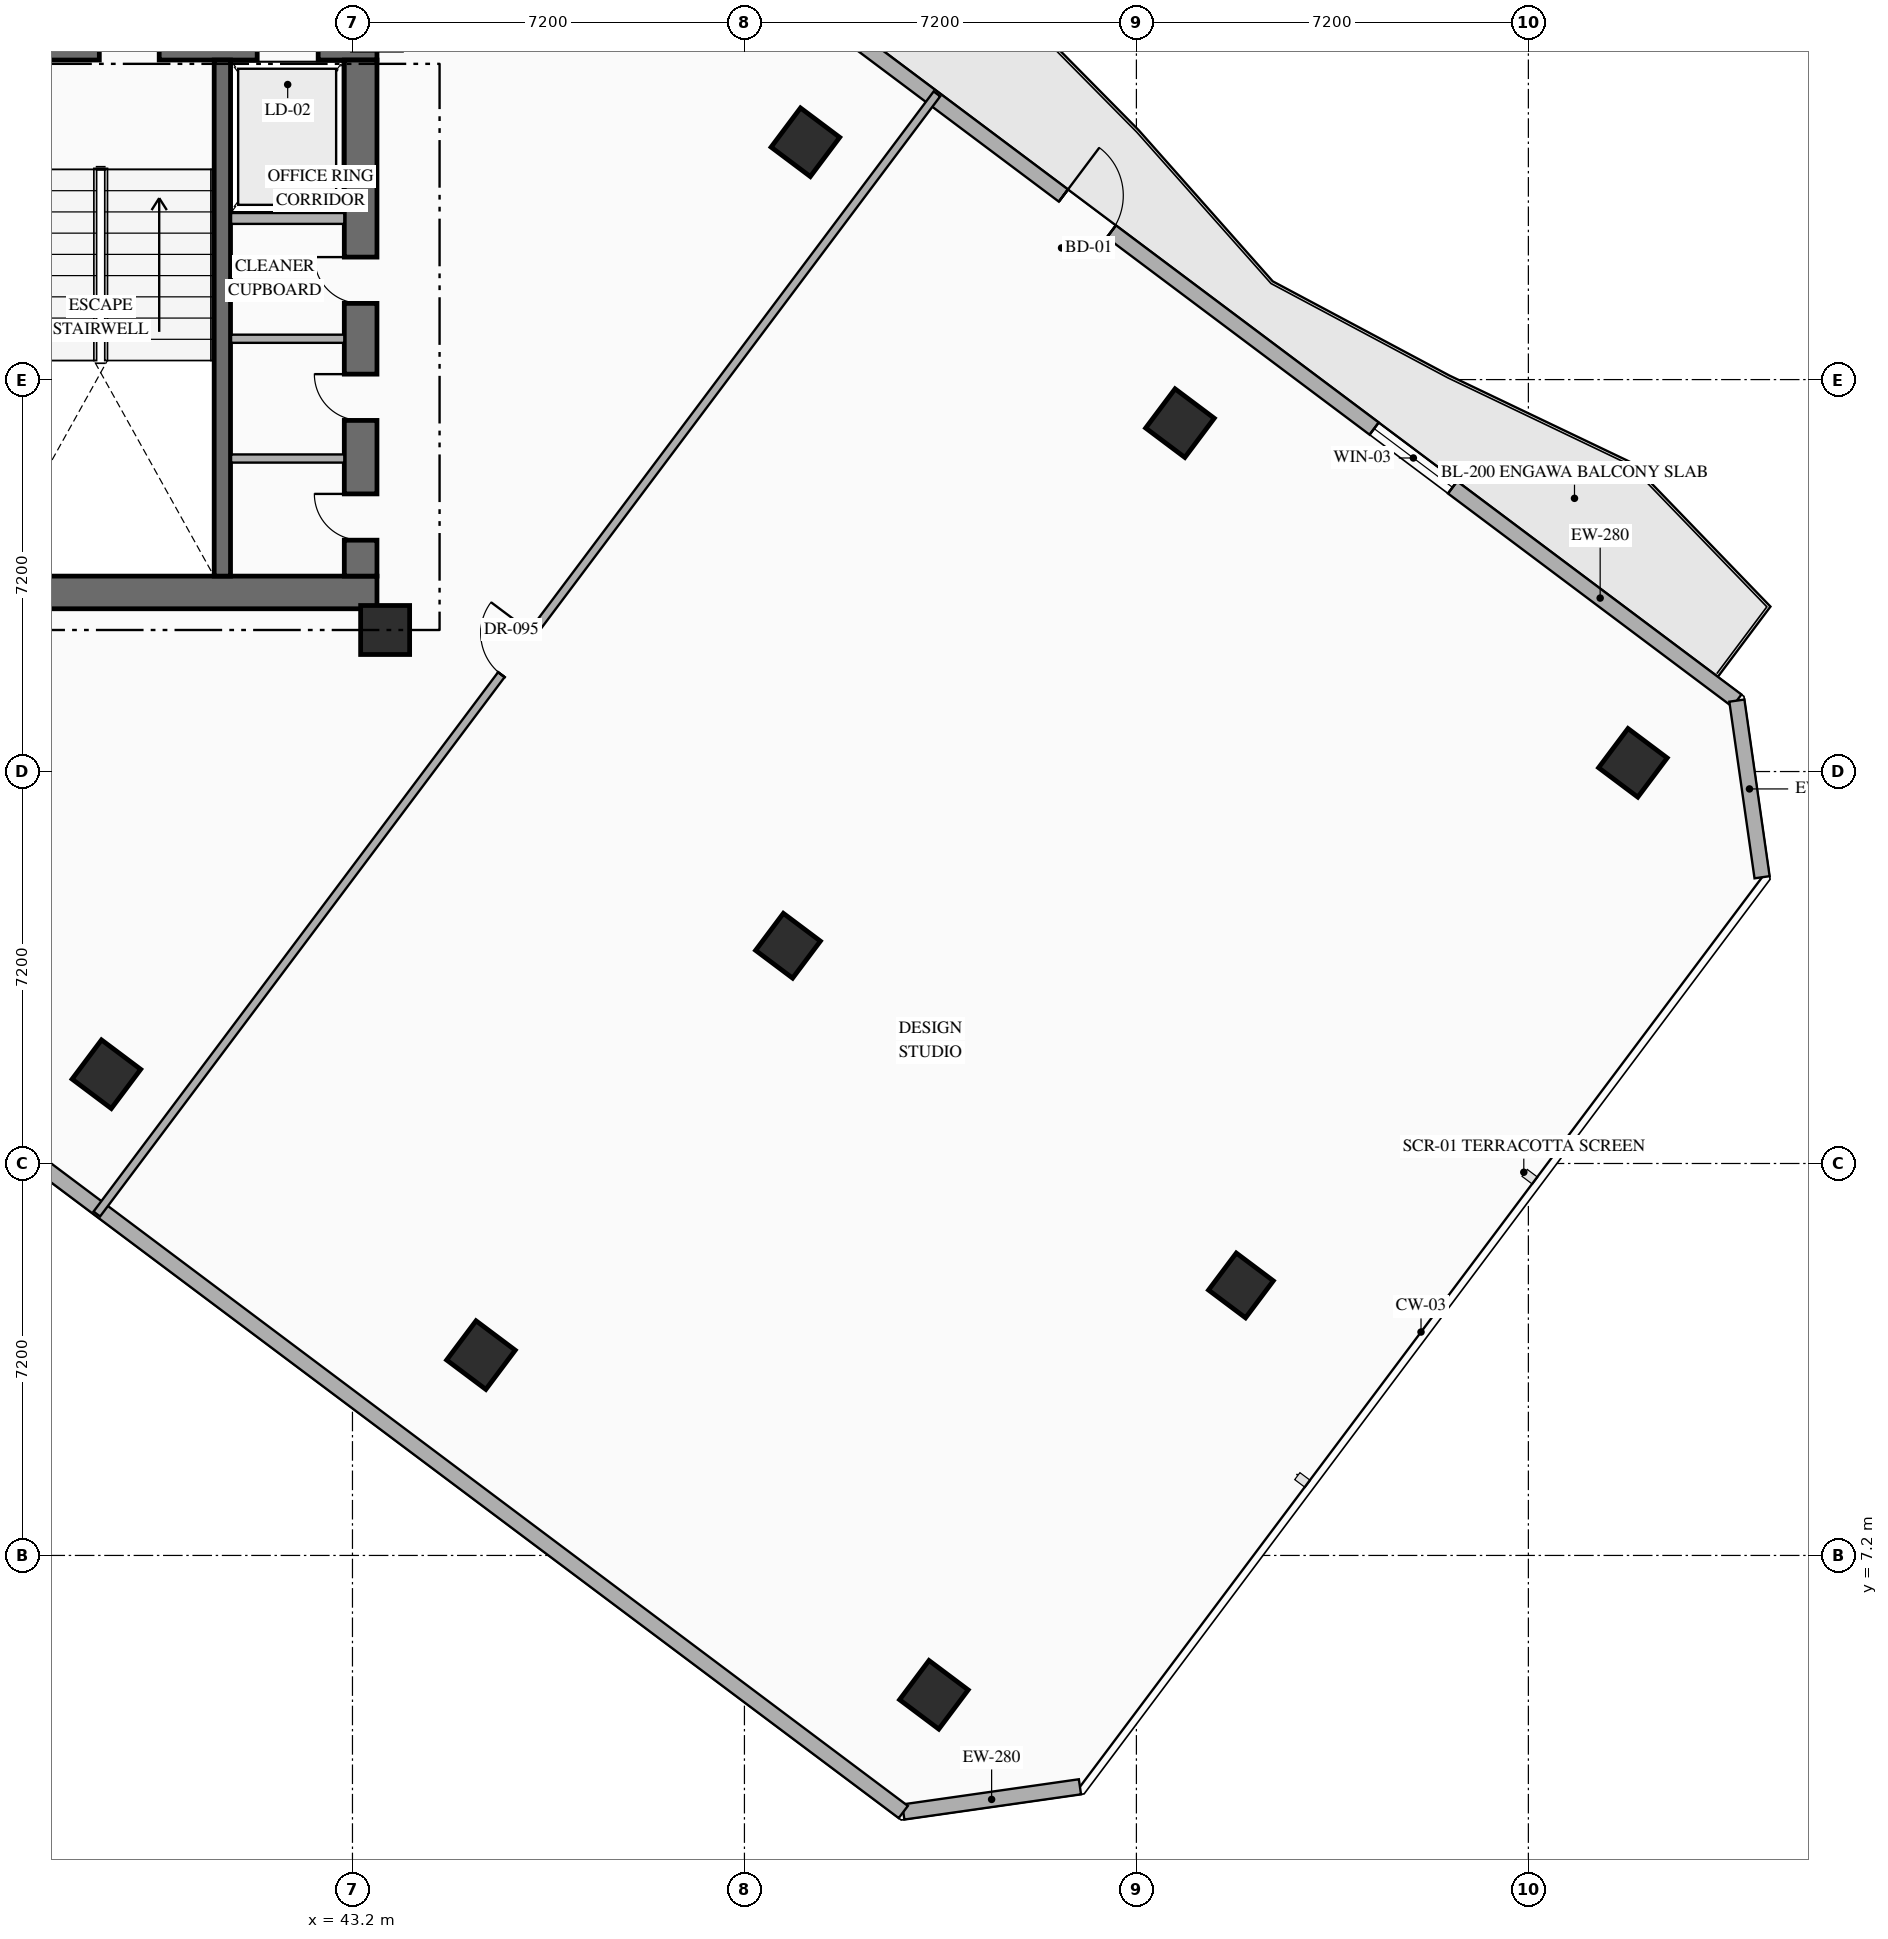
"""IFC4 building model, lengths in metres.
Left out: names, types, materials, properties, quantities, classifications, styles, units other than length and angle.
Written with IfcOpenShell. Run it as: python <this file> out.ifc"""

import sys

from ifc_helpers import new_model, si_unit, direction, frame, frame_2d, origin, origin_2d, place, context, subcontext, project, spatial, rectangle, hollow_rectangle, extrude, element, fill, save


model = new_model("IFC4")
c1 = context("Model", 3, precision=1e-05, world=origin(), true_north=direction((0.0, 1.0)))
c2 = subcontext(c1, "Body", "Model", "MODEL_VIEW")
j1 = project(units=[si_unit("LENGTHUNIT", "METRE"), si_unit("PLANEANGLEUNIT", "RADIAN")], contexts=[c1])
p1 = place(None, origin())
s1 = spatial("IfcSite", under=j1, at=p1, CompositionType="ELEMENT")
p2 = place(p1, origin())
s2 = spatial("IfcBuilding", under=s1, at=p2, CompositionType="ELEMENT")
p3 = place(p2, frame((0.0, 0.0, 104.85)))
s3 = spatial("IfcBuildingStorey", under=s2, at=p3, CompositionType="ELEMENT", Elevation=104.85)
p4 = place(p3, frame((35.89, 24.89, 0.0), z_axis=(0.0, 0.0, 1.0), x_axis=(1.0, 0.0, 0.0)))
e1 = element("IfcWall", 1, at=p4, inside=s3, PredefinedType="SHEAR", context=c2, shape_type="SweptSolid", body=[
    extrude(rectangle(XDim=7.76, YDim=0.6, at=frame_2d((3.88, 0.0))), origin(), (0.0, 0.0, 1.0), 3.6),
])
p5 = place(p3, frame((35.89, 34.97, 0.0), z_axis=(0.0, 0.0, 1.0), x_axis=(1.0, 0.0, 0.0)))
e2 = element("IfcWall", 2, at=p5, inside=s3, PredefinedType="SHEAR", context=c2, shape_type="SweptSolid", body=[
    extrude(rectangle(XDim=7.76, YDim=0.6, at=frame_2d((3.88, 0.0))), origin(), (0.0, 0.0, 1.0), 3.6),
])
p6 = place(p5, frame((2.66, 0.0, 0.0)))
e3 = element("IfcOpeningElement", 3, at=p6, cuts=e2, PredefinedType="OPENING", context=c2, shape_type="SweptSolid", body=[
    extrude(rectangle(XDim=1.1, YDim=2.2, at=frame_2d((0.55, 1.1))), frame((0.0, 0.31, 0.0), z_axis=(0.0, -1.0, 0.0), x_axis=(1.0, 0.0, 0.0)), (0.0, 0.0, 1.0), 0.62),
])
p7 = place(p5, frame((5.56, 0.0, 0.0)))
e4 = element("IfcOpeningElement", 4, at=p7, cuts=e2, PredefinedType="OPENING", context=c2, shape_type="SweptSolid", body=[
    extrude(rectangle(XDim=1.12, YDim=2.15, at=frame_2d((0.56, 1.075))), frame((0.0, 0.31, 0.0), z_axis=(0.0, -1.0, 0.0), x_axis=(1.0, 0.0, 0.0)), (0.0, 0.0, 1.0), 0.62),
])
p8 = place(p3, frame((43.35, 25.19, 0.0), z_axis=(0.0, 0.0, 1.0), x_axis=(0.0, 1.0, 0.0)))
e5 = element("IfcWall", 5, at=p8, inside=s3, PredefinedType="SHEAR", context=c2, shape_type="SweptSolid", body=[
    extrude(rectangle(XDim=9.48, YDim=0.6, at=frame_2d((4.74, 0.0))), origin(), (0.0, 0.0, 1.0), 3.6),
])
p9 = place(p8, frame((0.66, 0.0, 0.0)))
e6 = element("IfcOpeningElement", 6, at=p9, cuts=e5, PredefinedType="OPENING", context=c2, shape_type="SweptSolid", body=[
    extrude(rectangle(XDim=0.85, YDim=2.08, at=frame_2d((0.425, 1.04))), frame((0.0, 0.31, 0.0), z_axis=(0.0, -1.0, 0.0), x_axis=(1.0, 0.0, 0.0)), (0.0, 0.0, 1.0), 0.62),
])
p10 = place(p8, frame((2.86, 0.0, 0.0)))
e7 = element("IfcOpeningElement", 7, at=p10, cuts=e5, PredefinedType="OPENING", context=c2, shape_type="SweptSolid", body=[
    extrude(rectangle(XDim=0.85, YDim=2.08, at=frame_2d((0.425, 1.04))), frame((0.0, 0.31, 0.0), z_axis=(0.0, -1.0, 0.0), x_axis=(1.0, 0.0, 0.0)), (0.0, 0.0, 1.0), 0.62),
])
p11 = place(p8, frame((5.01, 0.0, 0.0)))
e8 = element("IfcOpeningElement", 8, at=p11, cuts=e5, PredefinedType="OPENING", context=c2, shape_type="SweptSolid", body=[
    extrude(rectangle(XDim=0.85, YDim=2.08, at=frame_2d((0.425, 1.04))), frame((0.0, 0.31, 0.0), z_axis=(0.0, -1.0, 0.0), x_axis=(1.0, 0.0, 0.0)), (0.0, 0.0, 1.0), 0.62),
])
p12 = place(p3, frame((40.81, 25.19, 0.0), z_axis=(0.0, 0.0, 1.0), x_axis=(0.0, 1.0, 0.0)))
e9 = element("IfcWall", 9, at=p12, inside=s3, PredefinedType="SHEAR", context=c2, shape_type="SweptSolid", body=[
    extrude(rectangle(XDim=9.48, YDim=0.3, at=frame_2d((4.74, 0.0))), origin(), (0.0, 0.0, 1.0), 3.6),
])
p13 = place(p3, frame((43.8, 24.2, 0.0), z_axis=(0.0, 0.0, 1.0), x_axis=(1.0, 0.0, 0.0)))
e10 = element("IfcColumn", 10, at=p13, inside=s3, PredefinedType="COLUMN", context=c2, shape_type="SweptSolid", body=[
    extrude(rectangle(XDim=0.9, YDim=0.9, at=origin_2d()), origin(), (0.0, 0.0, 1.0), 3.6),
])
for number, where, z_axis, x_axis in (
    (11, (38.68, 16.04, 0.0), (0.0, 0.0, 1.0), (0.8, -0.6, 0.0)),
    (12, (51.52, 33.16, 0.0), (0.0, 0.0, 1.0), (0.8, -0.6, 0.0)),
    (13, (45.56, 10.88, 0.0), (0.0, 0.0, 1.0), (0.8, -0.6, 0.0)),
    (14, (58.4, 28.0, 0.0), (0.0, 0.0, 1.0), (0.8, -0.6, 0.0)),
):
    element("IfcColumn", number, at=place(p3, frame(where, z_axis=z_axis, x_axis=x_axis)), inside=s3, PredefinedType="COLUMN", context=c2, shape_type="SweptSolid", body=[
        extrude(hollow_rectangle(XDim=0.9, YDim=0.9, WallThickness=0.036, at=origin_2d()), origin(), (0.0, 0.0, 1.0), 3.6),
    ])
p14 = place(p3, frame((51.2, 18.4, 0.0), z_axis=(0.0, 0.0, 1.0), x_axis=(0.799999996291, -0.600000004945, 0.0)))
e15 = element("IfcColumn", 15, at=p14, inside=s3, PredefinedType="COLUMN", context=c2, shape_type="SweptSolid", body=[
    extrude(hollow_rectangle(XDim=0.85, YDim=0.85, WallThickness=0.032, at=origin_2d()), origin(), (0.0, 0.0, 1.0), 3.6),
])
for number, where, z_axis, x_axis in (
    (16, (53.88, 4.64, 0.0), (0.0, 0.0, 1.0), (0.8, -0.6, 0.0)),
    (17, (66.72, 21.76, 0.0), (0.0, 0.0, 1.0), (0.8, -0.6, 0.0)),
):
    element("IfcColumn", number, at=place(p3, frame(where, z_axis=z_axis, x_axis=x_axis)), inside=s3, PredefinedType="COLUMN", context=c2, shape_type="SweptSolid", body=[
        extrude(hollow_rectangle(XDim=0.9, YDim=0.9, WallThickness=0.036, at=origin_2d()), origin(), (0.0, 0.0, 1.0), 3.6),
    ])
p15 = place(p3, frame((59.52, 12.16, 0.0), z_axis=(0.0, 0.0, 1.0), x_axis=(0.799999996291, -0.600000004945, 0.0)))
e18 = element("IfcColumn", 18, at=p15, inside=s3, PredefinedType="COLUMN", context=c2, shape_type="SweptSolid", body=[
    extrude(hollow_rectangle(XDim=0.85, YDim=0.85, WallThickness=0.032, at=origin_2d()), origin(), (0.0, 0.0, 1.0), 3.6),
])
p16 = place(p3, frame((44.86, 40.73, 0.0), z_axis=(0.0, 0.0, 1.0), x_axis=(0.800006902154, -0.599990797017, 0.0)))
e19 = element("IfcWall", 19, at=p16, inside=s3, PredefinedType="STANDARD", context=c2, shape_type="SweptSolid", body=[
    extrude(rectangle(XDim=29.712, YDim=0.28, at=frame_2d((14.856, 0.0))), origin(), (0.0, 0.0, 1.0), 3.35),
])
p17 = place(p16, frame((14.249, 0.0, 0.0)))
e20 = element("IfcOpeningElement", 20, at=p17, cuts=e19, PredefinedType="OPENING", context=c2, shape_type="SweptSolid", body=[
    extrude(rectangle(XDim=1.1, YDim=2.2, at=frame_2d((0.55, 1.1))), frame((0.0, 0.15, 0.0), z_axis=(0.0, -1.0, 0.0), x_axis=(1.0, 0.0, 0.0)), (0.0, 0.0, 1.0), 0.3),
])
p18 = place(p16, frame((6.528, 0.0, 0.85)))
e21 = element("IfcOpeningElement", 21, at=p18, cuts=e19, PredefinedType="OPENING", context=c2, shape_type="SweptSolid", body=[
    extrude(rectangle(XDim=1.8, YDim=2.1, at=frame_2d((0.9, 1.05))), frame((0.0, 0.15, 0.0), z_axis=(0.0, -1.0, 0.0), x_axis=(1.0, 0.0, 0.0)), (0.0, 0.0, 1.0), 0.3),
])
p19 = place(p16, frame((21.384, 0.0, 0.85)))
e22 = element("IfcOpeningElement", 22, at=p19, cuts=e19, PredefinedType="OPENING", context=c2, shape_type="SweptSolid", body=[
    extrude(rectangle(XDim=1.8, YDim=2.1, at=frame_2d((0.9, 1.05))), frame((0.0, 0.15, 0.0), z_axis=(0.0, -1.0, 0.0), x_axis=(1.0, 0.0, 0.0)), (0.0, 0.0, 1.0), 0.3),
])
p20 = place(p3, frame((68.63, 22.903, 0.0), z_axis=(0.0, 0.0, 1.0), x_axis=(0.141285803956, -0.989968848803, 0.0)))
e23 = element("IfcWall", 23, at=p20, inside=s3, PredefinedType="STANDARD", context=c2, shape_type="SweptSolid", body=[
    extrude(rectangle(XDim=3.278, YDim=0.28, at=frame_2d((1.639, 0.0))), origin(), (0.0, 0.0, 1.0), 3.35),
])
p21 = place(p3, frame((56.563, 2.95, 0.0), z_axis=(0.0, 0.0, 1.0), x_axis=(-0.989977778067, -0.141223223777, 0.0)))
e24 = element("IfcWall", 24, at=p21, inside=s3, PredefinedType="STANDARD", context=c2, shape_type="SweptSolid", body=[
    extrude(rectangle(XDim=3.278, YDim=0.28, at=frame_2d((1.639, 0.0))), origin(), (0.0, 0.0, 1.0), 3.35),
])
p22 = place(p3, frame((53.318, 2.487, 0.0), z_axis=(0.0, 0.0, 1.0), x_axis=(-0.800004174678, 0.599994433723, 0.0)))
e25 = element("IfcWall", 25, at=p22, inside=s3, PredefinedType="STANDARD", context=c2, shape_type="SweptSolid", body=[
    extrude(rectangle(XDim=35.089, YDim=0.28, at=frame_2d((17.544, 0.0))), origin(), (0.0, 0.0, 1.0), 3.35),
])
p23 = place(p3, frame((40.97, 31.76, 0.0), z_axis=(0.0, 0.0, 1.0), x_axis=(1.0, 0.0, 0.0)))
e26 = element("IfcWall", 26, at=p23, inside=s3, PredefinedType="STANDARD", context=c2, shape_type="SweptSolid", body=[
    extrude(rectangle(XDim=2.08, YDim=0.2, at=frame_2d((1.04, 0.0))), origin(), (0.0, 0.0, 1.0), 3.35),
])
for number, where, z_axis, x_axis in (
    (27, (40.97, 27.35, 0.0), (0.0, 0.0, 1.0), (1.0, 0.0, 0.0)),
    (28, (40.97, 29.55, 0.0), (0.0, 0.0, 1.0), (1.0, 0.0, 0.0)),
):
    element("IfcWall", number, at=place(p3, frame(where, z_axis=z_axis, x_axis=x_axis)), inside=s3, PredefinedType="PARTITIONING", context=c2, shape_type="SweptSolid", body=[
        extrude(rectangle(XDim=2.08, YDim=0.15, at=frame_2d((1.04, 0.0))), origin(), (0.0, 0.0, 1.0), 3.35),
    ])
p24 = place(p3, frame((38.504, 13.472, 0.0), z_axis=(0.0, 0.0, 1.0), x_axis=(0.6, 0.8, 0.0)))
e29 = element("IfcWall", 29, at=p24, inside=s3, PredefinedType="PARTITIONING", context=c2, shape_type="SweptSolid", body=[
    extrude(rectangle(XDim=25.72, YDim=0.15, at=frame_2d((12.86, 0.0))), origin(), (0.0, 0.0, 1.0), 3.35),
])
p25 = place(p24, frame((12.385, 0.0, 0.0)))
e30 = element("IfcOpeningElement", 30, at=p25, cuts=e29, PredefinedType="OPENING", context=c2, shape_type="SweptSolid", body=[
    extrude(rectangle(XDim=0.95, YDim=2.15, at=frame_2d((0.475, 1.075))), frame((0.0, 0.085, 0.0), z_axis=(0.0, -1.0, 0.0), x_axis=(1.0, 0.0, 0.0)), (0.0, 0.0, 1.0), 0.17),
])
p26 = place(p17, origin())
e31 = element("IfcDoor", 31, at=p26, inside=s3, OperationType="SINGLE_SWING_LEFT", PredefinedType="DOOR", context=c2, shape_type="SweptSolid", body=[
    extrude(rectangle(XDim=1.1, YDim=2.2, at=frame_2d((0.55, 1.1))), frame((0.0, 0.025, 0.0), z_axis=(0.0, -1.0, 0.0), x_axis=(1.0, 0.0, 0.0)), (0.0, 0.0, 1.0), 0.05),
])
fill(e20, e31)
p27 = place(p19, origin())
e32 = element("IfcWindow", 32, at=p27, inside=s3, PartitioningType="SINGLE_PANEL", PredefinedType="WINDOW", context=c2, shape_type="SweptSolid", body=[
    extrude(rectangle(XDim=1.8, YDim=2.1, at=frame_2d((0.9, 1.05))), frame((0.0, 0.03, 0.0), z_axis=(0.0, -1.0, 0.0), x_axis=(1.0, 0.0, 0.0)), (0.0, 0.0, 1.0), 0.06),
])
fill(e22, e32)
p28 = place(p9, origin())
e33 = element("IfcDoor", 33, at=p28, inside=s3, OperationType="SINGLE_SWING_RIGHT", PredefinedType="DOOR", context=c2, shape_type="SweptSolid", body=[
    extrude(rectangle(XDim=0.85, YDim=2.08, at=frame_2d((0.425, 1.04))), frame((0.0, 0.025, 0.0), z_axis=(0.0, -1.0, 0.0), x_axis=(1.0, 0.0, 0.0)), (0.0, 0.0, 1.0), 0.05),
])
fill(e6, e33)
p29 = place(p10, origin())
e34 = element("IfcDoor", 34, at=p29, inside=s3, OperationType="SINGLE_SWING_RIGHT", PredefinedType="DOOR", context=c2, shape_type="SweptSolid", body=[
    extrude(rectangle(XDim=0.85, YDim=2.08, at=frame_2d((0.425, 1.04))), frame((0.0, 0.025, 0.0), z_axis=(0.0, -1.0, 0.0), x_axis=(1.0, 0.0, 0.0)), (0.0, 0.0, 1.0), 0.05),
])
fill(e7, e34)
p30 = place(p11, origin())
e35 = element("IfcDoor", 35, at=p30, inside=s3, OperationType="SINGLE_SWING_RIGHT", PredefinedType="DOOR", context=c2, shape_type="SweptSolid", body=[
    extrude(rectangle(XDim=0.85, YDim=2.08, at=frame_2d((0.425, 1.04))), frame((0.0, 0.025, 0.0), z_axis=(0.0, -1.0, 0.0), x_axis=(1.0, 0.0, 0.0)), (0.0, 0.0, 1.0), 0.05),
])
fill(e8, e35)
p31 = place(p25, origin())
e36 = element("IfcDoor", 36, at=p31, inside=s3, OperationType="SINGLE_SWING_RIGHT", PredefinedType="DOOR", context=c2, shape_type="SweptSolid", body=[
    extrude(rectangle(XDim=0.95, YDim=2.15, at=frame_2d((0.475, 1.075))), frame((0.0, 0.025, 0.0), z_axis=(0.0, -1.0, 0.0), x_axis=(1.0, 0.0, 0.0)), (0.0, 0.0, 1.0), 0.05),
])
fill(e30, e36)
save(model, sys.argv[1])
